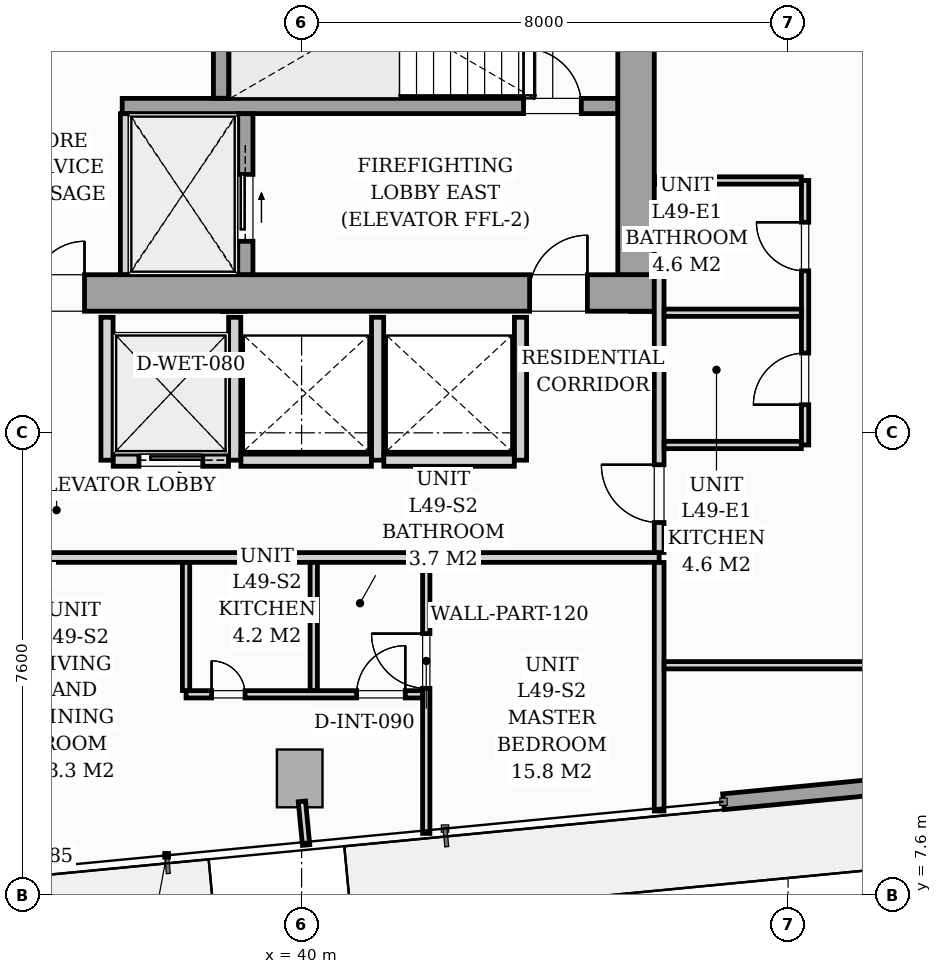
"""IFC4 building model, lengths in metres.
Left out: names, types, materials, properties, quantities, classifications, styles, units other than length and angle.
Written with IfcOpenShell. Run it as: python <this file> out.ifc"""

import sys

from ifc_helpers import new_model, si_unit, direction, frame, frame_2d, origin, origin_2d, place, context, subcontext, project, spatial, rectangle, i_section, extrude, source, transform, mapped, element, fill, save


model = new_model("IFC4")
c1 = context("Model", 3, precision=1e-05, world=origin(), true_north=direction((0.0, 1.0)))
c2 = subcontext(c1, "Body", "Model", "MODEL_VIEW")
j1 = project(units=[si_unit("LENGTHUNIT", "METRE"), si_unit("PLANEANGLEUNIT", "RADIAN")], contexts=[c1])
p1 = place(None, origin())
s1 = spatial("IfcSite", under=j1, at=p1, CompositionType="ELEMENT")
p2 = place(p1, origin())
s2 = spatial("IfcBuilding", under=s1, at=p2, CompositionType="ELEMENT")
p3 = place(p2, frame((0.0, 0.0, 173.0)))
s3 = spatial("IfcBuildingStorey", under=s2, at=p3, CompositionType="ELEMENT", Elevation=173.0)
m1 = source(origin(), c2, "Body", "SweptSolid", [
    extrude(i_section(OverallWidth=0.416, OverallDepth=0.446, WebThickness=0.039, FlangeThickness=0.063, FilletRadius=0.018, at=origin_2d()), origin(), (0.0, 0.0, 1.0), 3.196),
])
for number, where, z_axis, x_axis in (
    (1, (38.88, 17.4, 0.002), (0.0, 0.0, 1.0), (1.0, 0.0, 0.0)),
    (2, (45.6, 17.4, 0.002), (0.0, 0.0, 1.0), (1.0, 0.0, 0.0)),
):
    element("IfcColumn", number, at=place(p3, frame(where, z_axis=z_axis, x_axis=x_axis)), inside=s3, PredefinedType="PILASTER", context=c2, shape_type="MappedRepresentation", body=[
        mapped(m1, transform((0.0, 0.0, 0.0), scale=1.0)),
    ])
m2 = source(origin(), c2, "Body", "SweptSolid", [
    extrude(rectangle(XDim=0.75, YDim=0.95, at=origin_2d()), origin(), (0.0, 0.0, 1.0), 3.196),
])
p4 = place(p3, frame((39.969, 9.517, 0.002), z_axis=(0.0, 0.0, 1.0), x_axis=(0.995396198367, 0.09584575252, 0.0)))
e3 = element("IfcColumn", 3, at=p4, inside=s3, PredefinedType="COLUMN", context=c2, shape_type="MappedRepresentation", body=[
    mapped(m2, transform((0.0, 0.0, 0.0), scale=1.0)),
])
p5 = place(p3, frame((62.963, 10.676, 0.0), z_axis=(0.0, 0.0, 1.0), x_axis=(-0.995395627913, -0.095851676732, 0.0)))
e4 = element("IfcWall", 4, at=p5, inside=s3, PredefinedType="STANDARD", context=c2, shape_type="SweptSolid", body=[
    extrude(rectangle(XDim=16.1, YDim=0.26, at=frame_2d((8.05, 0.0))), origin(), (0.0, 0.0, 1.0), 2.94),
])
p6 = place(p5, frame((6.889, 0.0, 0.0)))
e5 = element("IfcOpeningElement", 5, at=p6, cuts=e4, PredefinedType="OPENING", context=c2, shape_type="SweptSolid", body=[
    extrude(rectangle(XDim=1.8, YDim=2.06, at=frame_2d((0.9, 1.03))), frame((0.0, 0.14, 0.0), z_axis=(0.0, -1.0, 0.0), x_axis=(1.0, 0.0, 0.0)), (0.0, 0.0, 1.0), 0.28),
])
p7 = place(p5, frame((2.05, 0.0, 0.65)))
e6 = element("IfcOpeningElement", 6, at=p7, cuts=e4, PredefinedType="OPENING", context=c2, shape_type="SweptSolid", body=[
    extrude(rectangle(XDim=1.6, YDim=1.5, at=frame_2d((0.8, 0.75))), frame((0.0, 0.14, 0.0), z_axis=(0.0, -1.0, 0.0), x_axis=(1.0, 0.0, 0.0)), (0.0, 0.0, 1.0), 0.28),
])
p8 = place(p3, frame((26.2, 17.5, 0.0), z_axis=(0.0, 0.0, 1.0), x_axis=(1.0, 0.0, 0.0)))
e7 = element("IfcWall", 7, at=p8, inside=s3, PredefinedType="SHEAR", context=c2, shape_type="SweptSolid", body=[
    extrude(rectangle(XDim=19.6, YDim=0.6, at=frame_2d((9.8, 0.0))), origin(), (0.0, 0.0, 1.0), 3.2),
])
p9 = place(p8, frame((0.95, 0.0, 0.0)))
e8 = element("IfcOpeningElement", 8, at=p9, cuts=e7, PredefinedType="OPENING", context=c2, shape_type="SweptSolid", body=[
    extrude(rectangle(XDim=0.95, YDim=2.06, at=frame_2d((0.475, 1.03))), frame((0.0, 0.31, 0.0), z_axis=(0.0, -1.0, 0.0), x_axis=(1.0, 0.0, 0.0)), (0.0, 0.0, 1.0), 0.62),
])
p10 = place(p8, frame((9.38, 0.0, 0.0)))
e9 = element("IfcOpeningElement", 9, at=p10, cuts=e7, PredefinedType="OPENING", context=c2, shape_type="SweptSolid", body=[
    extrude(rectangle(XDim=0.85, YDim=2.0, at=frame_2d((0.425, 1.0))), frame((0.0, 0.31, 0.0), z_axis=(0.0, -1.0, 0.0), x_axis=(1.0, 0.0, 0.0)), (0.0, 0.0, 1.0), 0.62),
])
p11 = place(p8, frame((17.55, 0.0, 0.0)))
e10 = element("IfcOpeningElement", 10, at=p11, cuts=e7, PredefinedType="OPENING", context=c2, shape_type="SweptSolid", body=[
    extrude(rectangle(XDim=0.95, YDim=2.06, at=frame_2d((0.475, 1.03))), frame((0.0, 0.31, 0.0), z_axis=(0.0, -1.0, 0.0), x_axis=(1.0, 0.0, 0.0)), (0.0, 0.0, 1.0), 0.62),
])
p12 = place(p3, frame((45.5, 17.802, 0.0), z_axis=(0.0, 0.0, 1.0), x_axis=(0.0, 1.0, 0.0)))
e11 = element("IfcWall", 11, at=p12, inside=s3, PredefinedType="SHEAR", context=c2, shape_type="SweptSolid", body=[
    extrude(rectangle(XDim=5.796, YDim=0.6, at=frame_2d((2.898, 0.0))), origin(), (0.0, 0.0, 1.0), 3.2),
])
p13 = place(p3, frame((37.05, 20.575, 0.0), z_axis=(0.0, 0.0, 1.0), x_axis=(1.0, 0.0, 0.0)))
e12 = element("IfcWall", 12, at=p13, inside=s3, PredefinedType="SOLIDWALL", context=c2, shape_type="SweptSolid", body=[
    extrude(rectangle(XDim=8.148, YDim=0.25, at=frame_2d((4.074, 0.0))), origin(), (0.0, 0.0, 1.0), 3.2),
])
p14 = place(p13, frame((6.6, 0.0, 0.0)))
e13 = element("IfcOpeningElement", 13, at=p14, cuts=e12, PredefinedType="OPENING", context=c2, shape_type="SweptSolid", body=[
    extrude(rectangle(XDim=0.95, YDim=2.06, at=frame_2d((0.475, 1.03))), frame((0.0, 0.135, 0.0), z_axis=(0.0, -1.0, 0.0), x_axis=(1.0, 0.0, 0.0)), (0.0, 0.0, 1.0), 0.27),
])
p15 = place(p3, frame((38.675, 20.702, 0.0), z_axis=(0.0, 0.0, 1.0), x_axis=(0.0, 1.0, 0.0)))
e14 = element("IfcWall", 14, at=p15, inside=s3, PredefinedType="SOLIDWALL", context=c2, shape_type="SweptSolid", body=[
    extrude(rectangle(XDim=2.896, YDim=0.25, at=frame_2d((1.448, 0.0))), origin(), (0.0, 0.0, 1.0), 3.2),
])
p16 = place(p3, frame((37.1, 17.802, 0.0), z_axis=(0.0, 0.0, 1.0), x_axis=(0.0, 1.0, 0.0)))
e15 = element("IfcWall", 15, at=p16, inside=s3, PredefinedType="PARTITIONING", context=c2, shape_type="SweptSolid", body=[
    extrude(rectangle(XDim=2.646, YDim=0.16, at=frame_2d((1.323, 0.0))), origin(), (0.0, 0.0, 1.0), 2.94),
])
p17 = place(p3, frame((39.075, 17.802, 0.0), z_axis=(0.0, 0.0, 1.0), x_axis=(0.0, 1.0, 0.0)))
e16 = element("IfcWall", 16, at=p17, inside=s3, PredefinedType="SOLIDWALL", context=c2, shape_type="SweptSolid", body=[
    extrude(rectangle(XDim=2.646, YDim=0.25, at=frame_2d((1.323, 0.0))), origin(), (0.0, 0.0, 1.0), 3.2),
])
p18 = place(p17, frame((0.548, 0.0, 0.0)))
e17 = element("IfcOpeningElement", 17, at=p18, cuts=e16, PredefinedType="OPENING", context=c2, shape_type="SweptSolid", body=[
    extrude(rectangle(XDim=1.1, YDim=2.08, at=frame_2d((0.55, 1.04))), frame((0.0, 0.135, 0.0), z_axis=(0.0, -1.0, 0.0), x_axis=(1.0, 0.0, 0.0)), (0.0, 0.0, 1.0), 0.27),
])
for number, where, z_axis, x_axis in (
    (18, (36.8, 14.75, 0.0), (0.0, 0.0, 1.0), (0.0, 1.0, 0.0)),
    (19, (38.9, 14.75, 0.0), (0.0, 0.0, 1.0), (0.0, 1.0, 0.0)),
):
    element("IfcWall", number, at=place(p3, frame(where, z_axis=z_axis, x_axis=x_axis)), inside=s3, PredefinedType="PARTITIONING", context=c2, shape_type="SweptSolid", body=[
        extrude(rectangle(XDim=2.35, YDim=0.2, at=frame_2d((1.175, 0.0))), origin(), (0.0, 0.0, 1.0), 2.94),
    ])
p19 = place(p3, frame((36.902, 14.75, 0.0), z_axis=(0.0, 0.0, 1.0), x_axis=(1.0, 0.0, 0.0)))
e20 = element("IfcWall", 20, at=p19, inside=s3, PredefinedType="PARTITIONING", context=c2, shape_type="SweptSolid", body=[
    extrude(rectangle(XDim=1.896, YDim=0.2, at=frame_2d((0.948, 0.0))), origin(), (0.0, 0.0, 1.0), 2.94),
])
p20 = place(p19, frame((0.423, 0.0, 0.0)))
e21 = element("IfcOpeningElement", 21, at=p20, cuts=e20, PredefinedType="OPENING", context=c2, shape_type="SweptSolid", body=[
    extrude(rectangle(XDim=1.05, YDim=2.08, at=frame_2d((0.525, 1.04))), frame((0.0, 0.11, 0.0), z_axis=(0.0, -1.0, 0.0), x_axis=(1.0, 0.0, 0.0)), (0.0, 0.0, 1.0), 0.22),
])
for number, where, z_axis, x_axis in (
    (22, (41.25, 14.75, 0.0), (0.0, 0.0, 1.0), (0.0, 1.0, 0.0)),
    (23, (43.6, 14.75, 0.0), (0.0, 0.0, 1.0), (0.0, 1.0, 0.0)),
):
    element("IfcWall", number, at=place(p3, frame(where, z_axis=z_axis, x_axis=x_axis)), inside=s3, PredefinedType="PARTITIONING", context=c2, shape_type="SweptSolid", body=[
        extrude(rectangle(XDim=2.35, YDim=0.2, at=frame_2d((1.175, 0.0))), origin(), (0.0, 0.0, 1.0), 2.94),
    ])
for number, where, z_axis, x_axis in (
    (24, (39.002, 14.75, 0.0), (0.0, 0.0, 1.0), (1.0, 0.0, 0.0)),
    (25, (41.352, 14.75, 0.0), (0.0, 0.0, 1.0), (1.0, 0.0, 0.0)),
):
    element("IfcWall", number, at=place(p3, frame(where, z_axis=z_axis, x_axis=x_axis)), inside=s3, PredefinedType="PARTITIONING", context=c2, shape_type="SweptSolid", body=[
        extrude(rectangle(XDim=2.146, YDim=0.2, at=frame_2d((1.073, 0.0))), origin(), (0.0, 0.0, 1.0), 2.94),
    ])
p21 = place(p3, frame((22.6, 13.15, 0.0), z_axis=(0.0, 0.0, 1.0), x_axis=(1.0, 0.0, 0.0)))
e26 = element("IfcWall", 26, at=p21, inside=s3, PredefinedType="PARTITIONING", context=c2, shape_type="SweptSolid", body=[
    extrude(rectangle(XDim=23.28, YDim=0.16, at=frame_2d((11.64, 0.0))), origin(), (0.0, 0.0, 1.0), 2.94),
])
p22 = place(p21, frame((0.607, 0.0, 0.0)))
e27 = element("IfcOpeningElement", 27, at=p22, cuts=e26, PredefinedType="OPENING", context=c2, shape_type="SweptSolid", body=[
    extrude(rectangle(XDim=0.95, YDim=2.06, at=frame_2d((0.475, 1.03))), frame((0.0, 0.09, 0.0), z_axis=(0.0, -1.0, 0.0), x_axis=(1.0, 0.0, 0.0)), (0.0, 0.0, 1.0), 0.18),
])
p23 = place(p21, frame((11.717, 0.0, 0.0)))
e28 = element("IfcOpeningElement", 28, at=p23, cuts=e26, PredefinedType="OPENING", context=c2, shape_type="SweptSolid", body=[
    extrude(rectangle(XDim=0.95, YDim=2.06, at=frame_2d((0.475, 1.03))), frame((0.0, 0.09, 0.0), z_axis=(0.0, -1.0, 0.0), x_axis=(1.0, 0.0, 0.0)), (0.0, 0.0, 1.0), 0.18),
])
p24 = place(p3, frame((45.88, 8.981, 0.0), z_axis=(0.0, 0.0, 1.0), x_axis=(0.0, 1.0, 0.0)))
e29 = element("IfcWall", 29, at=p24, inside=s3, PredefinedType="PARTITIONING", context=c2, shape_type="SweptSolid", body=[
    extrude(rectangle(XDim=4.087, YDim=0.16, at=frame_2d((2.043, 0.0))), origin(), (0.0, 0.0, 1.0), 2.94),
])
p25 = place(p3, frame((45.88, 13.232, 0.0), z_axis=(0.0, 0.0, 1.0), x_axis=(0.0, 1.0, 0.0)))
e30 = element("IfcWall", 30, at=p25, inside=s3, PredefinedType="PARTITIONING", context=c2, shape_type="SweptSolid", body=[
    extrude(rectangle(XDim=4.57, YDim=0.16, at=frame_2d((2.285, 0.0))), origin(), (0.0, 0.0, 1.0), 2.94),
])
p26 = place(p25, frame((0.493, 0.0, 0.0)))
e31 = element("IfcOpeningElement", 31, at=p26, cuts=e30, PredefinedType="OPENING", context=c2, shape_type="SweptSolid", body=[
    extrude(rectangle(XDim=0.95, YDim=2.06, at=frame_2d((0.475, 1.03))), frame((0.0, 0.09, 0.0), z_axis=(0.0, -1.0, 0.0), x_axis=(1.0, 0.0, 0.0)), (0.0, 0.0, 1.0), 0.18),
])
p27 = place(p3, frame((42.05, 8.612, 0.0), z_axis=(0.0, 0.0, 1.0), x_axis=(0.0, 1.0, 0.0)))
e32 = element("IfcWall", 32, at=p27, inside=s3, PredefinedType="PARTITIONING", context=c2, shape_type="SweptSolid", body=[
    extrude(rectangle(XDim=4.456, YDim=0.12, at=frame_2d((2.228, 0.0))), origin(), (0.0, 0.0, 1.0), 2.94),
])
p28 = place(p27, frame((2.386, 0.0, 0.0)))
e33 = element("IfcOpeningElement", 33, at=p28, cuts=e32, PredefinedType="OPENING", context=c2, shape_type="SweptSolid", body=[
    extrude(rectangle(XDim=0.9, YDim=2.05, at=frame_2d((0.45, 1.025))), frame((0.0, 0.07, 0.0), z_axis=(0.0, -1.0, 0.0), x_axis=(1.0, 0.0, 0.0)), (0.0, 0.0, 1.0), 0.14),
])
p29 = place(p3, frame((38.1, 10.9, 0.0), z_axis=(0.0, 0.0, 1.0), x_axis=(1.0, 0.0, 0.0)))
e34 = element("IfcWall", 34, at=p29, inside=s3, PredefinedType="PARTITIONING", context=c2, shape_type="SweptSolid", body=[
    extrude(rectangle(XDim=3.888, YDim=0.12, at=frame_2d((1.944, 0.0))), origin(), (0.0, 0.0, 1.0), 2.94),
])
p30 = place(p29, frame((0.42, 0.0, 0.0)))
e35 = element("IfcOpeningElement", 35, at=p30, cuts=e34, PredefinedType="OPENING", context=c2, shape_type="SweptSolid", body=[
    extrude(rectangle(XDim=0.55, YDim=2.0, at=frame_2d((0.275, 1.0))), frame((0.0, 0.07, 0.0), z_axis=(0.0, -1.0, 0.0), x_axis=(1.0, 0.0, 0.0)), (0.0, 0.0, 1.0), 0.14),
])
p31 = place(p29, frame((2.805, 0.0, 0.0)))
e36 = element("IfcOpeningElement", 36, at=p31, cuts=e34, PredefinedType="OPENING", context=c2, shape_type="SweptSolid", body=[
    extrude(rectangle(XDim=0.8, YDim=2.02, at=frame_2d((0.4, 1.01))), frame((0.0, 0.07, 0.0), z_axis=(0.0, -1.0, 0.0), x_axis=(1.0, 0.0, 0.0)), (0.0, 0.0, 1.0), 0.14),
])
for number, where, z_axis, x_axis in (
    (37, (40.2, 10.962, 0.0), (0.0, 0.0, 1.0), (0.0, 1.0, 0.0)),
    (38, (38.1, 10.962, 0.0), (0.0, 0.0, 1.0), (0.0, 1.0, 0.0)),
):
    element("IfcWall", number, at=place(p3, frame(where, z_axis=z_axis, x_axis=x_axis)), inside=s3, PredefinedType="PARTITIONING", context=c2, shape_type="SweptSolid", body=[
        extrude(rectangle(XDim=2.106, YDim=0.12, at=frame_2d((1.053, 0.0))), origin(), (0.0, 0.0, 1.0), 2.94),
    ])
p32 = place(p3, frame((48.28, 15.0, 0.0), z_axis=(0.0, 0.0, 1.0), x_axis=(0.0, 1.0, 0.0)))
e39 = element("IfcWall", 39, at=p32, inside=s3, PredefinedType="PARTITIONING", context=c2, shape_type="SweptSolid", body=[
    extrude(rectangle(XDim=4.35, YDim=0.12, at=frame_2d((2.175, 0.0))), origin(), (0.0, 0.0, 1.0), 2.94),
])
p33 = place(p32, frame((0.662, 0.0, 0.0)))
e40 = element("IfcOpeningElement", 40, at=p33, cuts=e39, PredefinedType="OPENING", context=c2, shape_type="SweptSolid", body=[
    extrude(rectangle(XDim=0.85, YDim=2.05, at=frame_2d((0.425, 1.025))), frame((0.0, 0.07, 0.0), z_axis=(0.0, -1.0, 0.0), x_axis=(1.0, 0.0, 0.0)), (0.0, 0.0, 1.0), 0.14),
])
p34 = place(p32, frame((2.863, 0.0, 0.0)))
e41 = element("IfcOpeningElement", 41, at=p34, cuts=e39, PredefinedType="OPENING", context=c2, shape_type="SweptSolid", body=[
    extrude(rectangle(XDim=0.8, YDim=2.02, at=frame_2d((0.4, 1.01))), frame((0.0, 0.07, 0.0), z_axis=(0.0, -1.0, 0.0), x_axis=(1.0, 0.0, 0.0)), (0.0, 0.0, 1.0), 0.14),
])
for number, where, z_axis, x_axis in (
    (42, (45.962, 17.175, 0.0), (0.0, 0.0, 1.0), (1.0, 0.0, 0.0)),
    (43, (45.962, 15.0, 0.0), (0.0, 0.0, 1.0), (1.0, 0.0, 0.0)),
):
    element("IfcWall", number, at=place(p3, frame(where, z_axis=z_axis, x_axis=x_axis)), inside=s3, PredefinedType="PARTITIONING", context=c2, shape_type="SweptSolid", body=[
        extrude(rectangle(XDim=2.256, YDim=0.12, at=frame_2d((1.128, 0.0))), origin(), (0.0, 0.0, 1.0), 2.94),
    ])
p35 = place(p3, frame((45.802, 19.35, 0.0), z_axis=(0.0, 0.0, 1.0), x_axis=(1.0, 0.0, 0.0)))
e44 = element("IfcWall", 44, at=p35, inside=s3, PredefinedType="PARTITIONING", context=c2, shape_type="SweptSolid", body=[
    extrude(rectangle(XDim=2.416, YDim=0.12, at=frame_2d((1.208, 0.0))), origin(), (0.0, 0.0, 1.0), 2.94),
])
p36 = place(p3, frame((45.962, 11.378, 0.0), z_axis=(0.0, 0.0, 1.0), x_axis=(1.0, 0.0, 0.0)))
e45 = element("IfcWall", 45, at=p36, inside=s3, PredefinedType="PARTITIONING", context=c2, shape_type="SweptSolid", body=[
    extrude(rectangle(XDim=16.671, YDim=0.12, at=frame_2d((8.335, 0.0))), origin(), (0.0, 0.0, 1.0), 2.383),
])
p37 = place(p36, frame((6.186, 0.0, 0.0)))
e46 = element("IfcOpeningElement", 46, at=p37, cuts=e45, PredefinedType="OPENING", context=c2, shape_type="SweptSolid", body=[
    extrude(rectangle(XDim=0.85, YDim=2.05, at=frame_2d((0.425, 1.025))), frame((0.0, 0.07, 0.0), z_axis=(0.0, -1.0, 0.0), x_axis=(1.0, 0.0, 0.0)), (0.0, 0.0, 1.0), 0.14),
])
p38 = place(p3, frame((40.005, 9.139, 0.0), z_axis=(0.0, 0.0, 1.0), x_axis=(0.095977354523, -0.995383517755, 0.0)))
e47 = element("IfcWall", 47, at=p38, inside=s3, PredefinedType="PARTITIONING", context=c2, shape_type="SweptSolid", body=[
    extrude(rectangle(XDim=0.72, YDim=0.12, at=frame_2d((0.36, 0.0))), origin(), (0.0, 0.0, 1.0), 2.94),
])
m3 = source(origin(), c2, "Body", "SweptSolid", [
    extrude(rectangle(XDim=0.85, YDim=2.0, at=frame_2d((0.425, 1.0))), frame((0.0, 0.025, 0.0), z_axis=(0.0, -1.0, 0.0), x_axis=(1.0, 0.0, 0.0)), (0.0, 0.0, 1.0), 0.05),
])
p39 = place(p10, origin())
e48 = element("IfcDoor", 48, at=p39, inside=s3, OperationType="SINGLE_SWING_RIGHT", PredefinedType="DOOR", context=c2, shape_type="MappedRepresentation", body=[
    mapped(m3, transform((0.0, 0.0, 0.0), scale=1.0)),
])
fill(e9, e48)
m4 = source(origin(), c2, "Body", "SweptSolid", [
    extrude(rectangle(XDim=0.95, YDim=2.06, at=frame_2d((0.475, 1.03))), frame((0.0, 0.025, 0.0), z_axis=(0.0, -1.0, 0.0), x_axis=(1.0, 0.0, 0.0)), (0.0, 0.0, 1.0), 0.05),
])
p40 = place(p11, origin())
e49 = element("IfcDoor", 49, at=p40, inside=s3, OperationType="SINGLE_SWING_RIGHT", PredefinedType="DOOR", context=c2, shape_type="MappedRepresentation", body=[
    mapped(m4, transform((0.0, 0.0, 0.0), scale=1.0)),
])
fill(e10, e49)
p41 = place(p14, origin())
e50 = element("IfcDoor", 50, at=p41, inside=s3, OperationType="SINGLE_SWING_LEFT", PredefinedType="DOOR", context=c2, shape_type="MappedRepresentation", body=[
    mapped(m4, transform((0.0, 0.0, 0.0), scale=1.0)),
])
fill(e13, e50)
m5 = source(origin(), c2, "Body", "SweptSolid", [
    extrude(rectangle(XDim=1.1, YDim=2.08, at=frame_2d((0.55, 1.04))), frame((0.0, 0.025, 0.0), z_axis=(0.0, -1.0, 0.0), x_axis=(1.0, 0.0, 0.0)), (0.0, 0.0, 1.0), 0.05),
])
p42 = place(p18, origin())
e51 = element("IfcDoor", 51, at=p42, inside=s3, OperationType="SLIDING_TO_RIGHT", PredefinedType="DOOR", context=c2, shape_type="MappedRepresentation", body=[
    mapped(m5, transform((0.0, 0.0, 0.0), scale=1.0)),
])
fill(e17, e51)
m6 = source(origin(), c2, "Body", "SweptSolid", [
    extrude(rectangle(XDim=1.05, YDim=2.08, at=frame_2d((0.525, 1.04))), frame((0.0, 0.025, 0.0), z_axis=(0.0, -1.0, 0.0), x_axis=(1.0, 0.0, 0.0)), (0.0, 0.0, 1.0), 0.05),
])
p43 = place(p20, origin())
e52 = element("IfcDoor", 52, at=p43, inside=s3, OperationType="SLIDING_TO_RIGHT", PredefinedType="DOOR", context=c2, shape_type="MappedRepresentation", body=[
    mapped(m6, transform((0.0, 0.0, 0.0), scale=1.0)),
])
fill(e21, e52)
m7 = source(origin(), c2, "Body", "SweptSolid", [
    extrude(rectangle(XDim=0.9, YDim=2.05, at=frame_2d((0.45, 1.025))), frame((0.0, 0.025, 0.0), z_axis=(0.0, -1.0, 0.0), x_axis=(1.0, 0.0, 0.0)), (0.0, 0.0, 1.0), 0.05),
])
p44 = place(p28, origin())
e53 = element("IfcDoor", 53, at=p44, inside=s3, OperationType="SINGLE_SWING_RIGHT", PredefinedType="DOOR", context=c2, shape_type="MappedRepresentation", body=[
    mapped(m7, transform((0.0, 0.0, 0.0), scale=1.0)),
])
fill(e33, e53)
m8 = source(origin(), c2, "Body", "SweptSolid", [
    extrude(rectangle(XDim=0.55, YDim=2.0, at=frame_2d((0.275, 1.0))), frame((0.0, 0.025, 0.0), z_axis=(0.0, -1.0, 0.0), x_axis=(1.0, 0.0, 0.0)), (0.0, 0.0, 1.0), 0.05),
])
p45 = place(p30, origin())
e54 = element("IfcDoor", 54, at=p45, inside=s3, OperationType="SINGLE_SWING_LEFT", PredefinedType="DOOR", context=c2, shape_type="MappedRepresentation", body=[
    mapped(m8, transform((0.0, 0.0, 0.0), scale=1.0)),
])
fill(e35, e54)
m9 = source(origin(), c2, "Body", "SweptSolid", [
    extrude(rectangle(XDim=0.8, YDim=2.02, at=frame_2d((0.4, 1.01))), frame((0.0, 0.025, 0.0), z_axis=(0.0, -1.0, 0.0), x_axis=(1.0, 0.0, 0.0)), (0.0, 0.0, 1.0), 0.05),
])
p46 = place(p31, origin())
e55 = element("IfcDoor", 55, at=p46, inside=s3, OperationType="SINGLE_SWING_RIGHT", PredefinedType="DOOR", context=c2, shape_type="MappedRepresentation", body=[
    mapped(m9, transform((0.0, 0.0, 0.0), scale=1.0)),
])
fill(e36, e55)
m10 = source(origin(), c2, "Body", "SweptSolid", [
    extrude(rectangle(XDim=0.95, YDim=2.06, at=frame_2d((0.475, 1.03))), frame((0.0, 0.025, 0.0), z_axis=(0.0, -1.0, 0.0), x_axis=(1.0, 0.0, 0.0)), (0.0, 0.0, 1.0), 0.05),
])
p47 = place(p26, origin())
e56 = element("IfcDoor", 56, at=p47, inside=s3, OperationType="SINGLE_SWING_RIGHT", PredefinedType="DOOR", context=c2, shape_type="MappedRepresentation", body=[
    mapped(m10, transform((0.0, 0.0, 0.0), scale=1.0)),
])
fill(e31, e56)
m11 = source(origin(), c2, "Body", "SweptSolid", [
    extrude(rectangle(XDim=0.85, YDim=2.05, at=frame_2d((0.425, 1.025))), frame((0.0, 0.025, 0.0), z_axis=(0.0, -1.0, 0.0), x_axis=(1.0, 0.0, 0.0)), (0.0, 0.0, 1.0), 0.05),
])
p48 = place(p33, origin())
e57 = element("IfcDoor", 57, at=p48, inside=s3, OperationType="SINGLE_SWING_LEFT", PredefinedType="DOOR", context=c2, shape_type="MappedRepresentation", body=[
    mapped(m11, transform((0.0, 0.0, 0.0), scale=1.0)),
])
fill(e40, e57)
p49 = place(p34, origin())
e58 = element("IfcDoor", 58, at=p49, inside=s3, OperationType="SINGLE_SWING_RIGHT", PredefinedType="DOOR", context=c2, shape_type="MappedRepresentation", body=[
    mapped(m9, transform((0.0, 0.0, 0.0), scale=1.0)),
])
fill(e41, e58)
save(model, sys.argv[1])
